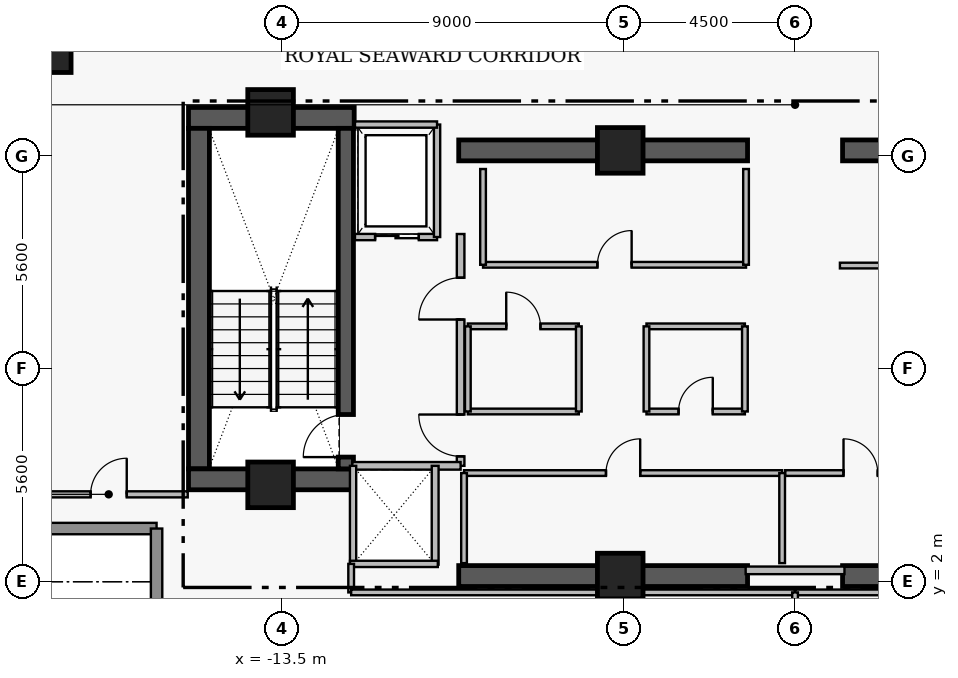
"""IFC4 building model, lengths in metres.
Left out: names, types, materials, properties, quantities, classifications, styles, units other than length and angle.
Written with IfcOpenShell. Run it as: python <this file> out.ifc"""

import sys

from ifc_helpers import new_model, si_unit, direction, frame, frame_2d, origin, origin_2d, place, context, subcontext, project, spatial, rectangle, extrude, element, fill, save


model = new_model("IFC4")
c1 = context("Model", 3, precision=1e-05, world=origin(), true_north=direction((0.0, 1.0)))
c2 = subcontext(c1, "Body", "Model", "MODEL_VIEW")
j1 = project(units=[si_unit("LENGTHUNIT", "METRE"), si_unit("PLANEANGLEUNIT", "RADIAN")], contexts=[c1])
p1 = place(None, origin())
s1 = spatial("IfcSite", under=j1, at=p1, CompositionType="ELEMENT")
p2 = place(p1, origin())
s2 = spatial("IfcBuilding", under=s1, at=p2, CompositionType="ELEMENT")
p3 = place(p2, frame((0.0, 0.0, 272.95)))
s3 = spatial("IfcBuildingStorey", under=s2, at=p3, CompositionType="ELEMENT", Elevation=272.95)
p4 = place(p3, frame((-15.96, 14.205, 0.0), z_axis=(0.0, 0.0, 1.0), x_axis=(1.0, 0.0, 0.0)))
e1 = element("IfcWall", 1, at=p4, inside=s3, PredefinedType="SHEAR", context=c2, shape_type="SweptSolid", body=[
    extrude(rectangle(XDim=4.36, YDim=0.55, at=frame_2d((2.18, 0.0))), origin(), (0.0, 0.0, 1.0), 3.51),
])
p5 = place(p3, frame((-15.685, 4.97, 0.0), z_axis=(0.0, 0.0, 1.0), x_axis=(0.0, 1.0, 0.0)))
e2 = element("IfcWall", 2, at=p5, inside=s3, PredefinedType="SHEAR", context=c2, shape_type="SweptSolid", body=[
    extrude(rectangle(XDim=8.96, YDim=0.55, at=frame_2d((4.48, 0.0))), origin(), (0.0, 0.0, 1.0), 3.51),
])
p6 = place(p3, frame((-15.96, 4.695, 0.0), z_axis=(0.0, 0.0, 1.0), x_axis=(1.0, 0.0, 0.0)))
e3 = element("IfcWall", 3, at=p6, inside=s3, PredefinedType="SHEAR", context=c2, shape_type="SweptSolid", body=[
    extrude(rectangle(XDim=4.36, YDim=0.55, at=frame_2d((2.18, 0.0))), origin(), (0.0, 0.0, 1.0), 3.51),
])
for number, where, z_axis, x_axis in (
    (4, (-8.85, 2.15, 0.0), (0.0, 0.0, 1.0), (1.0, 0.0, 0.0)),
    (5, (1.25, 2.15, 0.0), (0.0, 0.0, 1.0), (1.0, 0.0, 0.0)),
    (6, (-8.85, 13.35, 0.0), (0.0, 0.0, 1.0), (1.0, 0.0, 0.0)),
    (7, (1.25, 13.35, 0.0), (0.0, 0.0, 1.0), (1.0, 0.0, 0.0)),
):
    element("IfcWall", number, at=place(p3, frame(where, z_axis=z_axis, x_axis=x_axis)), inside=s3, PredefinedType="SHEAR", context=c2, shape_type="SweptSolid", body=[
        extrude(rectangle(XDim=7.6, YDim=0.55, at=frame_2d((3.8, 0.0))), origin(), (0.0, 0.0, 1.0), 3.48),
    ])
p7 = place(p3, frame((-11.82, 4.97, 0.0), z_axis=(0.0, 0.0, 1.0), x_axis=(0.0, 1.0, 0.0)))
e8 = element("IfcWall", 8, at=p7, inside=s3, PredefinedType="SHEAR", context=c2, shape_type="SweptSolid", body=[
    extrude(rectangle(XDim=8.96, YDim=0.4, at=frame_2d((4.48, 0.0))), origin(), (0.0, 0.0, 1.0), 3.51),
])
p8 = place(p7, frame((0.31, 0.0, 0.0)))
e9 = element("IfcOpeningElement", 9, at=p8, cuts=e8, PredefinedType="OPENING", context=c2, shape_type="SweptSolid", body=[
    extrude(rectangle(XDim=1.12, YDim=2.22, at=frame_2d((0.56, 1.11))), frame((0.0, 0.21, 0.0), z_axis=(0.0, -1.0, 0.0), x_axis=(1.0, 0.0, 0.0)), (0.0, 0.0, 1.0), 0.42),
])
for number, where, z_axis, x_axis in (
    (10, (-13.8, 14.35, 0.0), (0.0, 0.0, 1.0), (1.0, 0.0, 0.0)),
    (11, (-4.6, 13.35, 0.0), (0.0, 0.0, 1.0), (1.0, 0.0, 0.0)),
    (12, (-13.8, 4.55, 0.0), (0.0, 0.0, 1.0), (1.0, 0.0, 0.0)),
    (13, (-4.6, 2.15, 0.0), (0.0, 0.0, 1.0), (1.0, 0.0, 0.0)),
):
    element("IfcColumn", number, at=place(p3, frame(where, z_axis=z_axis, x_axis=x_axis)), inside=s3, PredefinedType="COLUMN", context=c2, shape_type="SweptSolid", body=[
        extrude(rectangle(XDim=1.2, YDim=1.2, at=origin_2d()), origin(), (0.0, 0.0, 1.0), 3.7),
    ])
p9 = place(p3, frame((-19.55, 15.9, 0.0), z_axis=(0.0, 0.0, 1.0), x_axis=(1.0, 0.0, 0.0)))
e14 = element("IfcColumn", 14, at=p9, inside=s3, PredefinedType="COLUMN", context=c2, shape_type="SweptSolid", body=[
    extrude(rectangle(XDim=1.0, YDim=1.0, at=origin_2d()), origin(), (0.0, 0.0, 1.0), 3.7),
])
for number, where, z_axis, x_axis in (
    (15, (-16.8, 3.4, 0.0), (0.0, 0.0, 1.0), (-1.0, 0.0, 0.0)),
    (16, (-16.8, 0.0, 0.0), (0.0, 0.0, 1.0), (0.0, 1.0, 0.0)),
):
    element("IfcWall", number, at=place(p3, frame(where, z_axis=z_axis, x_axis=x_axis)), inside=s3, PredefinedType="STANDARD", context=c2, shape_type="SweptSolid", body=[
        extrude(rectangle(XDim=3.4, YDim=0.3, at=frame_2d((1.7, 0.0))), origin(), (0.0, 0.0, 1.0), 3.48),
    ])
p10 = place(p3, frame((-8.8, 5.05, 0.0), z_axis=(0.0, 0.0, 1.0), x_axis=(0.0, 1.0, 0.0)))
e17 = element("IfcWall", 17, at=p10, inside=s3, PredefinedType="PARTITIONING", context=c2, shape_type="SweptSolid", body=[
    extrude(rectangle(XDim=6.1, YDim=0.2, at=frame_2d((3.05, 0.0))), origin(), (0.0, 0.0, 1.0), 3.48),
])
p11 = place(p10, frame((0.25, 0.0, 0.0)))
e18 = element("IfcOpeningElement", 18, at=p11, cuts=e17, PredefinedType="OPENING", context=c2, shape_type="SweptSolid", body=[
    extrude(rectangle(XDim=1.1, YDim=2.2, at=frame_2d((0.55, 1.1))), frame((0.0, 0.11, 0.0), z_axis=(0.0, -1.0, 0.0), x_axis=(1.0, 0.0, 0.0)), (0.0, 0.0, 1.0), 0.22),
])
p12 = place(p10, frame((3.85, 0.0, 0.0)))
e19 = element("IfcOpeningElement", 19, at=p12, cuts=e17, PredefinedType="OPENING", context=c2, shape_type="SweptSolid", body=[
    extrude(rectangle(XDim=1.1, YDim=2.2, at=frame_2d((0.55, 1.1))), frame((0.0, 0.11, 0.0), z_axis=(0.0, -1.0, 0.0), x_axis=(1.0, 0.0, 0.0)), (0.0, 0.0, 1.0), 0.22),
])
p13 = place(p3, frame((-11.58, 11.07, 0.0), z_axis=(0.0, 0.0, 1.0), x_axis=(1.0, 0.0, 0.0)))
e20 = element("IfcWall", 20, at=p13, inside=s3, PredefinedType="PARTITIONING", context=c2, shape_type="SweptSolid", body=[
    extrude(rectangle(XDim=2.16, YDim=0.165, at=frame_2d((1.08, 0.0))), origin(), (0.0, 0.0, 1.0), 3.48),
])
p14 = place(p13, frame((0.53, 0.0, 0.0)))
e21 = element("IfcOpeningElement", 21, at=p14, cuts=e20, PredefinedType="OPENING", context=c2, shape_type="SweptSolid", body=[
    extrude(rectangle(XDim=1.15, YDim=2.25, at=frame_2d((0.575, 1.125))), frame((0.0, 0.093, 0.0), z_axis=(0.0, -1.0, 0.0), x_axis=(1.0, 0.0, 0.0)), (0.0, 0.0, 1.0), 0.185),
])
p15 = place(p3, frame((-8.71, 4.86, 0.0), z_axis=(0.0, 0.0, 1.0), x_axis=(1.0, 0.0, 0.0)))
e22 = element("IfcWall", 22, at=p15, inside=s3, PredefinedType="PARTITIONING", context=c2, shape_type="SweptSolid", body=[
    extrude(rectangle(XDim=8.37, YDim=0.15, at=frame_2d((4.185, 0.0))), origin(), (0.0, 0.0, 1.0), 3.48),
])
p16 = place(p15, frame((3.735, 0.0, 0.0)))
e23 = element("IfcOpeningElement", 23, at=p16, cuts=e22, PredefinedType="OPENING", context=c2, shape_type="SweptSolid", body=[
    extrude(rectangle(XDim=0.9, YDim=2.15, at=frame_2d((0.45, 1.075))), frame((0.0, 0.085, 0.0), z_axis=(0.0, -1.0, 0.0), x_axis=(1.0, 0.0, 0.0)), (0.0, 0.0, 1.0), 0.17),
])
p17 = place(p3, frame((-0.26, 4.86, 0.0), z_axis=(0.0, 0.0, 1.0), x_axis=(1.0, 0.0, 0.0)))
e24 = element("IfcWall", 24, at=p17, inside=s3, PredefinedType="PARTITIONING", context=c2, shape_type="SweptSolid", body=[
    extrude(rectangle(XDim=3.97, YDim=0.15, at=frame_2d((1.985, 0.0))), origin(), (0.0, 0.0, 1.0), 3.48),
])
p18 = place(p17, frame((1.535, 0.0, 0.0)))
e25 = element("IfcOpeningElement", 25, at=p18, cuts=e24, PredefinedType="OPENING", context=c2, shape_type="SweptSolid", body=[
    extrude(rectangle(XDim=0.9, YDim=2.15, at=frame_2d((0.45, 1.075))), frame((0.0, 0.085, 0.0), z_axis=(0.0, -1.0, 0.0), x_axis=(1.0, 0.0, 0.0)), (0.0, 0.0, 1.0), 0.17),
])
p19 = place(p3, frame((-8.21, 10.34, 0.0), z_axis=(0.0, 0.0, 1.0), x_axis=(1.0, 0.0, 0.0)))
e26 = element("IfcWall", 26, at=p19, inside=s3, PredefinedType="PARTITIONING", context=c2, shape_type="SweptSolid", body=[
    extrude(rectangle(XDim=6.92, YDim=0.15, at=frame_2d((3.46, 0.0))), origin(), (0.0, 0.0, 1.0), 3.48),
])
p20 = place(p19, frame((3.01, 0.0, 0.0)))
e27 = element("IfcOpeningElement", 27, at=p20, cuts=e26, PredefinedType="OPENING", context=c2, shape_type="SweptSolid", body=[
    extrude(rectangle(XDim=0.9, YDim=2.15, at=frame_2d((0.45, 1.075))), frame((0.0, 0.085, 0.0), z_axis=(0.0, -1.0, 0.0), x_axis=(1.0, 0.0, 0.0)), (0.0, 0.0, 1.0), 0.17),
])
p21 = place(p3, frame((-8.61, 8.72, 0.0), z_axis=(0.0, 0.0, 1.0), x_axis=(1.0, 0.0, 0.0)))
e28 = element("IfcWall", 28, at=p21, inside=s3, PredefinedType="PARTITIONING", context=c2, shape_type="SweptSolid", body=[
    extrude(rectangle(XDim=2.92, YDim=0.15, at=frame_2d((1.46, 0.0))), origin(), (0.0, 0.0, 1.0), 3.48),
])
p22 = place(p21, frame((1.01, 0.0, 0.0)))
e29 = element("IfcOpeningElement", 29, at=p22, cuts=e28, PredefinedType="OPENING", context=c2, shape_type="SweptSolid", body=[
    extrude(rectangle(XDim=0.9, YDim=2.15, at=frame_2d((0.45, 1.075))), frame((0.0, 0.085, 0.0), z_axis=(0.0, -1.0, 0.0), x_axis=(1.0, 0.0, 0.0)), (0.0, 0.0, 1.0), 0.17),
])
p23 = place(p3, frame((-3.91, 6.48, 0.0), z_axis=(0.0, 0.0, 1.0), x_axis=(1.0, 0.0, 0.0)))
e30 = element("IfcWall", 30, at=p23, inside=s3, PredefinedType="PARTITIONING", context=c2, shape_type="SweptSolid", body=[
    extrude(rectangle(XDim=2.59, YDim=0.15, at=frame_2d((1.295, 0.0))), origin(), (0.0, 0.0, 1.0), 3.48),
])
p24 = place(p23, frame((0.845, 0.0, 0.0)))
e31 = element("IfcOpeningElement", 31, at=p24, cuts=e30, PredefinedType="OPENING", context=c2, shape_type="SweptSolid", body=[
    extrude(rectangle(XDim=0.9, YDim=2.15, at=frame_2d((0.45, 1.075))), frame((0.0, 0.085, 0.0), z_axis=(0.0, -1.0, 0.0), x_axis=(1.0, 0.0, 0.0)), (0.0, 0.0, 1.0), 0.17),
])
p25 = place(p3, frame((-20.14, 4.3, 0.0), z_axis=(0.0, 0.0, 1.0), x_axis=(1.0, 0.0, 0.0)))
e32 = element("IfcWall", 32, at=p25, inside=s3, PredefinedType="PARTITIONING", context=c2, shape_type="SweptSolid", body=[
    extrude(rectangle(XDim=4.16, YDim=0.16, at=frame_2d((2.08, 0.0))), origin(), (0.0, 0.0, 1.0), 3.48),
])
p26 = place(p25, frame((1.605, 0.0, 0.0)))
e33 = element("IfcOpeningElement", 33, at=p26, cuts=e32, PredefinedType="OPENING", context=c2, shape_type="SweptSolid", body=[
    extrude(rectangle(XDim=0.95, YDim=2.15, at=frame_2d((0.475, 1.075))), frame((0.0, 0.09, 0.0), z_axis=(0.0, -1.0, 0.0), x_axis=(1.0, 0.0, 0.0)), (0.0, 0.0, 1.0), 0.18),
])
p27 = place(p3, frame((-11.65, 5.05, 0.0), z_axis=(0.0, 0.0, 1.0), x_axis=(1.0, 0.0, 0.0)))
e34 = element("IfcWall", 34, at=p27, inside=s3, PredefinedType="PARTITIONING", context=c2, shape_type="SweptSolid", body=[
    extrude(rectangle(XDim=2.85, YDim=0.2, at=frame_2d((1.425, 0.0))), origin(), (0.0, 0.0, 1.0), 3.48),
])
p28 = place(p3, frame((-9.42, 11.07, 0.0), z_axis=(0.0, 0.0, 1.0), x_axis=(0.0, 1.0, 0.0)))
e35 = element("IfcWall", 35, at=p28, inside=s3, PredefinedType="PARTITIONING", context=c2, shape_type="SweptSolid", body=[
    extrude(rectangle(XDim=2.96, YDim=0.165, at=frame_2d((1.48, 0.0))), origin(), (0.0, 0.0, 1.0), 3.48),
])
p29 = place(p3, frame((-11.58, 14.03, 0.0), z_axis=(0.0, 0.0, 1.0), x_axis=(1.0, 0.0, 0.0)))
e36 = element("IfcWall", 36, at=p29, inside=s3, PredefinedType="PARTITIONING", context=c2, shape_type="SweptSolid", body=[
    extrude(rectangle(XDim=2.16, YDim=0.165, at=frame_2d((1.08, 0.0))), origin(), (0.0, 0.0, 1.0), 3.48),
])
p30 = place(p3, frame((-1.3, 2.3, 0.0), z_axis=(0.0, 0.0, 1.0), x_axis=(1.0, 0.0, 0.0)))
e37 = element("IfcWall", 37, at=p30, inside=s3, PredefinedType="PARTITIONING", context=c2, shape_type="SweptSolid", body=[
    extrude(rectangle(XDim=2.6, YDim=0.2, at=frame_2d((1.3, 0.0))), origin(), (0.0, 0.0, 1.0), 2.38),
])
for number, where, z_axis, x_axis in (
    (38, (-8.71, 2.49, 0.0), (0.0, 0.0, 1.0), (0.0, 1.0, 0.0)),
    (39, (-0.34, 2.49, 0.0), (0.0, 0.0, 1.0), (0.0, 1.0, 0.0)),
):
    element("IfcWall", number, at=place(p3, frame(where, z_axis=z_axis, x_axis=x_axis)), inside=s3, PredefinedType="PARTITIONING", context=c2, shape_type="SweptSolid", body=[
        extrude(rectangle(XDim=2.37, YDim=0.15, at=frame_2d((1.185, 0.0))), origin(), (0.0, 0.0, 1.0), 3.48),
    ])
for number, where, z_axis, x_axis in (
    (40, (-8.21, 10.34, 0.0), (0.0, 0.0, 1.0), (0.0, 1.0, 0.0)),
    (41, (-1.29, 10.34, 0.0), (0.0, 0.0, 1.0), (0.0, 1.0, 0.0)),
):
    element("IfcWall", number, at=place(p3, frame(where, z_axis=z_axis, x_axis=x_axis)), inside=s3, PredefinedType="PARTITIONING", context=c2, shape_type="SweptSolid", body=[
        extrude(rectangle(XDim=2.52, YDim=0.15, at=frame_2d((1.26, 0.0))), origin(), (0.0, 0.0, 1.0), 3.48),
    ])
p31 = place(p3, frame((-9.47, 2.45, 0.0), z_axis=(0.0, 0.0, 1.0), x_axis=(0.0, 1.0, 0.0)))
e42 = element("IfcWall", 42, at=p31, inside=s3, PredefinedType="PARTITIONING", context=c2, shape_type="SweptSolid", body=[
    extrude(rectangle(XDim=2.6, YDim=0.18, at=frame_2d((1.3, 0.0))), origin(), (0.0, 0.0, 1.0), 3.48),
])
p32 = place(p3, frame((-11.63, 2.47, 0.0), z_axis=(0.0, 0.0, 1.0), x_axis=(0.0, 1.0, 0.0)))
e43 = element("IfcWall", 43, at=p32, inside=s3, PredefinedType="PARTITIONING", context=c2, shape_type="SweptSolid", body=[
    extrude(rectangle(XDim=2.58, YDim=0.165, at=frame_2d((1.29, 0.0))), origin(), (0.0, 0.0, 1.0), 3.48),
])
p33 = place(p3, frame((-11.71, 2.47, 0.0), z_axis=(0.0, 0.0, 1.0), x_axis=(1.0, 0.0, 0.0)))
e44 = element("IfcWall", 44, at=p33, inside=s3, PredefinedType="PARTITIONING", context=c2, shape_type="SweptSolid", body=[
    extrude(rectangle(XDim=2.31, YDim=0.165, at=frame_2d((1.155, 0.0))), origin(), (0.0, 0.0, 1.0), 2.38),
])
p34 = place(p3, frame((-8.61, 6.48, 0.0), z_axis=(0.0, 0.0, 1.0), x_axis=(1.0, 0.0, 0.0)))
e45 = element("IfcWall", 45, at=p34, inside=s3, PredefinedType="PARTITIONING", context=c2, shape_type="SweptSolid", body=[
    extrude(rectangle(XDim=2.92, YDim=0.15, at=frame_2d((1.46, 0.0))), origin(), (0.0, 0.0, 1.0), 3.48),
])
for number, where, z_axis, x_axis in (
    (46, (-8.61, 6.48, 0.0), (0.0, 0.0, 1.0), (0.0, 1.0, 0.0)),
    (47, (-5.69, 6.48, 0.0), (0.0, 0.0, 1.0), (0.0, 1.0, 0.0)),
):
    element("IfcWall", number, at=place(p3, frame(where, z_axis=z_axis, x_axis=x_axis)), inside=s3, PredefinedType="PARTITIONING", context=c2, shape_type="SweptSolid", body=[
        extrude(rectangle(XDim=2.24, YDim=0.15, at=frame_2d((1.12, 0.0))), origin(), (0.0, 0.0, 1.0), 3.48),
    ])
p35 = place(p3, frame((-3.91, 8.72, 0.0), z_axis=(0.0, 0.0, 1.0), x_axis=(1.0, 0.0, 0.0)))
e48 = element("IfcWall", 48, at=p35, inside=s3, PredefinedType="PARTITIONING", context=c2, shape_type="SweptSolid", body=[
    extrude(rectangle(XDim=2.59, YDim=0.15, at=frame_2d((1.295, 0.0))), origin(), (0.0, 0.0, 1.0), 3.48),
])
for number, where, z_axis, x_axis in (
    (49, (-3.91, 6.48, 0.0), (0.0, 0.0, 1.0), (0.0, 1.0, 0.0)),
    (50, (-1.32, 6.48, 0.0), (0.0, 0.0, 1.0), (0.0, 1.0, 0.0)),
):
    element("IfcWall", number, at=place(p3, frame(where, z_axis=z_axis, x_axis=x_axis)), inside=s3, PredefinedType="PARTITIONING", context=c2, shape_type="SweptSolid", body=[
        extrude(rectangle(XDim=2.24, YDim=0.15, at=frame_2d((1.12, 0.0))), origin(), (0.0, 0.0, 1.0), 3.48),
    ])
p36 = place(p3, frame((1.18, 10.32, 0.0), z_axis=(0.0, 0.0, 1.0), x_axis=(1.0, 0.0, 0.0)))
e51 = element("IfcWall", 51, at=p36, inside=s3, PredefinedType="PARTITIONING", context=c2, shape_type="SweptSolid", body=[
    extrude(rectangle(XDim=2.54, YDim=0.15, at=frame_2d((1.27, 0.0))), origin(), (0.0, 0.0, 1.0), 3.48),
])
p37 = place(p3, frame((-11.68, 1.72, 0.0), z_axis=(0.0, 0.0, 1.0), x_axis=(0.0, 1.0, 0.0)))
e52 = element("IfcWall", 52, at=p37, inside=s3, PredefinedType="PARTITIONING", context=c2, shape_type="SweptSolid", body=[
    extrude(rectangle(XDim=0.75, YDim=0.15, at=frame_2d((0.375, 0.0))), origin(), (0.0, 0.0, 1.0), 3.48),
])
for number, where, z_axis, x_axis in (
    (53, (-11.68, 1.72, 0.0), (0.0, 0.0, 1.0), (1.0, 0.0, 0.0)),
    (54, (0.0, 1.72, 0.0), (0.0, 0.0, 1.0), (1.0, 0.0, 0.0)),
):
    element("IfcWall", number, at=place(p3, frame(where, z_axis=z_axis, x_axis=x_axis)), inside=s3, PredefinedType="PARTITIONING", context=c2, shape_type="SweptSolid", body=[
        extrude(rectangle(XDim=11.68, YDim=0.15, at=frame_2d((5.84, 0.0))), origin(), (0.0, 0.0, 1.0), 2.38),
    ])
p38 = place(p3, frame((0.0, 0.06, 0.0), z_axis=(0.0, 0.0, 1.0), x_axis=(0.0, 1.0, 0.0)))
e55 = element("IfcWall", 55, at=p38, inside=s3, PredefinedType="PARTITIONING", context=c2, shape_type="SweptSolid", body=[
    extrude(rectangle(XDim=1.66, YDim=0.15, at=frame_2d((0.83, 0.0))), origin(), (0.0, 0.0, 1.0), 3.48),
])
p39 = place(p8, origin())
e56 = element("IfcDoor", 56, at=p39, inside=s3, OperationType="SINGLE_SWING_LEFT", PredefinedType="DOOR", context=c2, shape_type="SweptSolid", body=[
    extrude(rectangle(XDim=1.12, YDim=2.22, at=frame_2d((0.56, 1.11))), frame((0.0, 0.025, 0.0), z_axis=(0.0, -1.0, 0.0), x_axis=(1.0, 0.0, 0.0)), (0.0, 0.0, 1.0), 0.05),
])
fill(e9, e56)
p40 = place(p11, origin())
e57 = element("IfcDoor", 57, at=p40, inside=s3, OperationType="SINGLE_SWING_RIGHT", PredefinedType="DOOR", context=c2, shape_type="SweptSolid", body=[
    extrude(rectangle(XDim=1.1, YDim=2.2, at=frame_2d((0.55, 1.1))), frame((0.0, 0.025, 0.0), z_axis=(0.0, -1.0, 0.0), x_axis=(1.0, 0.0, 0.0)), (0.0, 0.0, 1.0), 0.05),
])
fill(e18, e57)
p41 = place(p12, origin())
e58 = element("IfcDoor", 58, at=p41, inside=s3, OperationType="SINGLE_SWING_LEFT", PredefinedType="DOOR", context=c2, shape_type="SweptSolid", body=[
    extrude(rectangle(XDim=1.1, YDim=2.2, at=frame_2d((0.55, 1.1))), frame((0.0, 0.025, 0.0), z_axis=(0.0, -1.0, 0.0), x_axis=(1.0, 0.0, 0.0)), (0.0, 0.0, 1.0), 0.05),
])
fill(e19, e58)
p42 = place(p14, origin())
e59 = element("IfcDoor", 59, at=p42, inside=s3, OperationType="SLIDING_TO_LEFT", PredefinedType="DOOR", context=c2, shape_type="SweptSolid", body=[
    extrude(rectangle(XDim=1.15, YDim=2.25, at=frame_2d((0.575, 1.125))), frame((0.0, 0.025, 0.0), z_axis=(0.0, -1.0, 0.0), x_axis=(1.0, 0.0, 0.0)), (0.0, 0.0, 1.0), 0.05),
])
fill(e21, e59)
p43 = place(p16, origin())
e60 = element("IfcDoor", 60, at=p43, inside=s3, OperationType="SINGLE_SWING_RIGHT", PredefinedType="DOOR", context=c2, shape_type="SweptSolid", body=[
    extrude(rectangle(XDim=0.9, YDim=2.15, at=frame_2d((0.45, 1.075))), frame((0.0, 0.025, 0.0), z_axis=(0.0, -1.0, 0.0), x_axis=(1.0, 0.0, 0.0)), (0.0, 0.0, 1.0), 0.05),
])
fill(e23, e60)
p44 = place(p18, origin())
e61 = element("IfcDoor", 61, at=p44, inside=s3, OperationType="SINGLE_SWING_LEFT", PredefinedType="DOOR", context=c2, shape_type="SweptSolid", body=[
    extrude(rectangle(XDim=0.9, YDim=2.15, at=frame_2d((0.45, 1.075))), frame((0.0, 0.025, 0.0), z_axis=(0.0, -1.0, 0.0), x_axis=(1.0, 0.0, 0.0)), (0.0, 0.0, 1.0), 0.05),
])
fill(e25, e61)
p45 = place(p20, origin())
e62 = element("IfcDoor", 62, at=p45, inside=s3, OperationType="SINGLE_SWING_RIGHT", PredefinedType="DOOR", context=c2, shape_type="SweptSolid", body=[
    extrude(rectangle(XDim=0.9, YDim=2.15, at=frame_2d((0.45, 1.075))), frame((0.0, 0.025, 0.0), z_axis=(0.0, -1.0, 0.0), x_axis=(1.0, 0.0, 0.0)), (0.0, 0.0, 1.0), 0.05),
])
fill(e27, e62)
p46 = place(p22, origin())
e63 = element("IfcDoor", 63, at=p46, inside=s3, OperationType="SINGLE_SWING_LEFT", PredefinedType="DOOR", context=c2, shape_type="SweptSolid", body=[
    extrude(rectangle(XDim=0.9, YDim=2.15, at=frame_2d((0.45, 1.075))), frame((0.0, 0.025, 0.0), z_axis=(0.0, -1.0, 0.0), x_axis=(1.0, 0.0, 0.0)), (0.0, 0.0, 1.0), 0.05),
])
fill(e29, e63)
p47 = place(p24, origin())
e64 = element("IfcDoor", 64, at=p47, inside=s3, OperationType="SINGLE_SWING_RIGHT", PredefinedType="DOOR", context=c2, shape_type="SweptSolid", body=[
    extrude(rectangle(XDim=0.9, YDim=2.15, at=frame_2d((0.45, 1.075))), frame((0.0, 0.025, 0.0), z_axis=(0.0, -1.0, 0.0), x_axis=(1.0, 0.0, 0.0)), (0.0, 0.0, 1.0), 0.05),
])
fill(e31, e64)
p48 = place(p26, origin())
e65 = element("IfcDoor", 65, at=p48, inside=s3, OperationType="SINGLE_SWING_RIGHT", PredefinedType="DOOR", context=c2, shape_type="SweptSolid", body=[
    extrude(rectangle(XDim=0.95, YDim=2.15, at=frame_2d((0.475, 1.075))), frame((0.0, 0.025, 0.0), z_axis=(0.0, -1.0, 0.0), x_axis=(1.0, 0.0, 0.0)), (0.0, 0.0, 1.0), 0.05),
])
fill(e33, e65)
save(model, sys.argv[1])
